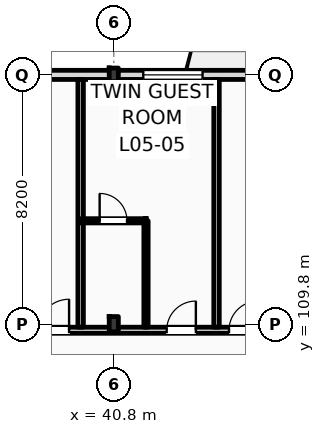
"""IFC4 building model, lengths in metres.
Left out: names, types, materials, properties, quantities, classifications, styles, units other than length and angle.
Written with IfcOpenShell. Run it as: python <this file> out.ifc"""

import sys

from ifc_helpers import new_model, si_unit, direction, frame, frame_2d, origin, origin_2d, place, context, subcontext, project, spatial, rectangle, i_section, extrude, element, fill, save


model = new_model("IFC4")
c1 = context("Model", 3, precision=1e-05, world=origin(), true_north=direction((0.0, 1.0)))
c2 = subcontext(c1, "Body", "Model", "MODEL_VIEW")
j1 = project(units=[si_unit("LENGTHUNIT", "METRE"), si_unit("PLANEANGLEUNIT", "RADIAN")], contexts=[c1])
p1 = place(None, origin())
s1 = spatial("IfcSite", under=j1, at=p1, CompositionType="ELEMENT")
p2 = place(p1, origin())
s2 = spatial("IfcBuilding", under=s1, at=p2, CompositionType="ELEMENT")
p3 = place(p2, frame((0.0, 0.0, 24.6)))
s3 = spatial("IfcBuildingStorey", under=s2, at=p3, CompositionType="ELEMENT", Elevation=24.6)
p4 = place(p3, frame((40.8, 109.8, 0.0), z_axis=(0.0, 0.0, 1.0), x_axis=(1.0, 0.0, 0.0)))
e1 = element("IfcColumn", 1, at=p4, inside=s3, PredefinedType="COLUMN", context=c2, shape_type="SweptSolid", body=[
    extrude(i_section(OverallWidth=0.3, OverallDepth=0.5, WebThickness=0.014, FlangeThickness=0.028, FilletRadius=0.027, at=origin_2d()), origin(), (0.0, 0.0, 1.0), 3.6),
])
p5 = place(p3, frame((40.8, 118.0, 0.0), z_axis=(0.0, 0.0, 1.0), x_axis=(1.0, 0.0, 0.0)))
e2 = element("IfcColumn", 2, at=p5, inside=s3, PredefinedType="COLUMN", context=c2, shape_type="SweptSolid", body=[
    extrude(i_section(OverallWidth=0.3, OverallDepth=0.45, WebThickness=0.014, FlangeThickness=0.026, FilletRadius=0.027, at=origin_2d()), origin(), (0.0, 0.0, 1.0), 3.6),
])
p6 = place(p3, frame((22.5, 118.0, 0.0), z_axis=(0.0, 0.0, 1.0), x_axis=(1.0, 0.0, 0.0)))
e3 = element("IfcWall", 3, at=p6, inside=s3, PredefinedType="STANDARD", context=c2, shape_type="SweptSolid", body=[
    extrude(rectangle(XDim=97.5, YDim=0.3, at=frame_2d((48.75, 0.0))), origin(), (0.0, 0.0, 1.0), 2.78),
])
p7 = place(p6, frame((0.91, 0.0, 0.9)))
e4 = element("IfcOpeningElement", 4, at=p7, cuts=e3, PredefinedType="OPENING", context=c2, shape_type="SweptSolid", body=[
    extrude(rectangle(XDim=0.9, YDim=1.7, at=frame_2d((0.45, 0.85))), frame((0.0, 0.16, 0.0), z_axis=(0.0, -1.0, 0.0), x_axis=(1.0, 0.0, 0.0)), (0.0, 0.0, 1.0), 0.32),
])
p8 = place(p6, frame((6.275, 0.0, 0.0)))
e5 = element("IfcOpeningElement", 5, at=p8, cuts=e3, PredefinedType="OPENING", context=c2, shape_type="SweptSolid", body=[
    extrude(rectangle(XDim=1.2, YDim=2.25, at=frame_2d((0.6, 1.125))), frame((0.0, 0.16, 0.0), z_axis=(0.0, -1.0, 0.0), x_axis=(1.0, 0.0, 0.0)), (0.0, 0.0, 1.0), 0.32),
])
p9 = place(p6, frame((11.42, 0.0, 0.9)))
e6 = element("IfcOpeningElement", 6, at=p9, cuts=e3, PredefinedType="OPENING", context=c2, shape_type="SweptSolid", body=[
    extrude(rectangle(XDim=1.35, YDim=1.7, at=frame_2d((0.675, 0.85))), frame((0.0, 0.16, 0.0), z_axis=(0.0, -1.0, 0.0), x_axis=(1.0, 0.0, 0.0)), (0.0, 0.0, 1.0), 0.32),
])
p10 = place(p6, frame((14.345, 0.0, 0.9)))
e7 = element("IfcOpeningElement", 7, at=p10, cuts=e3, PredefinedType="OPENING", context=c2, shape_type="SweptSolid", body=[
    extrude(rectangle(XDim=1.8, YDim=1.7, at=frame_2d((0.9, 0.85))), frame((0.0, 0.16, 0.0), z_axis=(0.0, -1.0, 0.0), x_axis=(1.0, 0.0, 0.0)), (0.0, 0.0, 1.0), 0.32),
])
p11 = place(p6, frame((19.27, 0.0, 0.9)))
e8 = element("IfcOpeningElement", 8, at=p11, cuts=e3, PredefinedType="OPENING", context=c2, shape_type="SweptSolid", body=[
    extrude(rectangle(XDim=1.95, YDim=1.7, at=frame_2d((0.975, 0.85))), frame((0.0, 0.16, 0.0), z_axis=(0.0, -1.0, 0.0), x_axis=(1.0, 0.0, 0.0)), (0.0, 0.0, 1.0), 0.32),
])
p12 = place(p6, frame((22.97, 0.0, 0.0)))
e9 = element("IfcOpeningElement", 9, at=p12, cuts=e3, PredefinedType="OPENING", context=c2, shape_type="SweptSolid", body=[
    extrude(rectangle(XDim=1.2, YDim=2.25, at=frame_2d((0.6, 1.125))), frame((0.0, 0.16, 0.0), z_axis=(0.0, -1.0, 0.0), x_axis=(1.0, 0.0, 0.0)), (0.0, 0.0, 1.0), 0.32),
])
p13 = place(p6, frame((26.92, 0.0, 0.9)))
e10 = element("IfcOpeningElement", 10, at=p13, cuts=e3, PredefinedType="OPENING", context=c2, shape_type="SweptSolid", body=[
    extrude(rectangle(XDim=2.25, YDim=1.7, at=frame_2d((1.125, 0.85))), frame((0.0, 0.16, 0.0), z_axis=(0.0, -1.0, 0.0), x_axis=(1.0, 0.0, 0.0)), (0.0, 0.0, 1.0), 0.32),
])
p14 = place(p6, frame((30.645, 0.0, 0.9)))
e11 = element("IfcOpeningElement", 11, at=p14, cuts=e3, PredefinedType="OPENING", context=c2, shape_type="SweptSolid", body=[
    extrude(rectangle(XDim=2.4, YDim=1.7, at=frame_2d((1.2, 0.85))), frame((0.0, 0.16, 0.0), z_axis=(0.0, -1.0, 0.0), x_axis=(1.0, 0.0, 0.0)), (0.0, 0.0, 1.0), 0.32),
])
p15 = place(p6, frame((36.71, 0.0, 0.0)))
e12 = element("IfcOpeningElement", 12, at=p15, cuts=e3, PredefinedType="OPENING", context=c2, shape_type="SweptSolid", body=[
    extrude(rectangle(XDim=1.2, YDim=2.25, at=frame_2d((0.6, 1.125))), frame((0.0, 0.16, 0.0), z_axis=(0.0, -1.0, 0.0), x_axis=(1.0, 0.0, 0.0)), (0.0, 0.0, 1.0), 0.32),
])
p16 = place(p6, frame((39.17, 0.0, 0.0)))
e13 = element("IfcOpeningElement", 13, at=p16, cuts=e3, PredefinedType="OPENING", context=c2, shape_type="SweptSolid", body=[
    extrude(rectangle(XDim=1.2, YDim=2.25, at=frame_2d((0.6, 1.125))), frame((0.0, 0.16, 0.0), z_axis=(0.0, -1.0, 0.0), x_axis=(1.0, 0.0, 0.0)), (0.0, 0.0, 1.0), 0.32),
])
p17 = place(p6, frame((43.22, 0.0, 0.9)))
e14 = element("IfcOpeningElement", 14, at=p17, cuts=e3, PredefinedType="OPENING", context=c2, shape_type="SweptSolid", body=[
    extrude(rectangle(XDim=2.85, YDim=1.7, at=frame_2d((1.425, 0.85))), frame((0.0, 0.16, 0.0), z_axis=(0.0, -1.0, 0.0), x_axis=(1.0, 0.0, 0.0)), (0.0, 0.0, 1.0), 0.32),
])
p18 = place(p6, frame((47.29, 0.0, 0.9)))
e15 = element("IfcOpeningElement", 15, at=p18, cuts=e3, PredefinedType="OPENING", context=c2, shape_type="SweptSolid", body=[
    extrude(rectangle(XDim=1.35, YDim=1.7, at=frame_2d((0.675, 0.85))), frame((0.0, 0.16, 0.0), z_axis=(0.0, -1.0, 0.0), x_axis=(1.0, 0.0, 0.0)), (0.0, 0.0, 1.0), 0.32),
])
p19 = place(p6, frame((52.91, 0.0, 0.0)))
e16 = element("IfcOpeningElement", 16, at=p19, cuts=e3, PredefinedType="OPENING", context=c2, shape_type="SweptSolid", body=[
    extrude(rectangle(XDim=1.2, YDim=2.25, at=frame_2d((0.6, 1.125))), frame((0.0, 0.16, 0.0), z_axis=(0.0, -1.0, 0.0), x_axis=(1.0, 0.0, 0.0)), (0.0, 0.0, 1.0), 0.32),
])
p20 = place(p6, frame((55.69, 0.0, 0.9)))
e17 = element("IfcOpeningElement", 17, at=p20, cuts=e3, PredefinedType="OPENING", context=c2, shape_type="SweptSolid", body=[
    extrude(rectangle(XDim=0.9, YDim=1.7, at=frame_2d((0.45, 0.85))), frame((0.0, 0.16, 0.0), z_axis=(0.0, -1.0, 0.0), x_axis=(1.0, 0.0, 0.0)), (0.0, 0.0, 1.0), 0.32),
])
p21 = place(p6, frame((59.82, 0.0, 0.9)))
e18 = element("IfcOpeningElement", 18, at=p21, cuts=e3, PredefinedType="OPENING", context=c2, shape_type="SweptSolid", body=[
    extrude(rectangle(XDim=3.25, YDim=1.7, at=frame_2d((1.625, 0.85))), frame((0.0, 0.16, 0.0), z_axis=(0.0, -1.0, 0.0), x_axis=(1.0, 0.0, 0.0)), (0.0, 0.0, 1.0), 0.32),
])
p22 = place(p6, frame((65.89, 0.0, 0.9)))
e19 = element("IfcOpeningElement", 19, at=p22, cuts=e3, PredefinedType="OPENING", context=c2, shape_type="SweptSolid", body=[
    extrude(rectangle(XDim=1.1, YDim=1.7, at=frame_2d((0.55, 0.85))), frame((0.0, 0.16, 0.0), z_axis=(0.0, -1.0, 0.0), x_axis=(1.0, 0.0, 0.0)), (0.0, 0.0, 1.0), 0.32),
])
p23 = place(p6, frame((69.245, 0.0, 0.0)))
e20 = element("IfcOpeningElement", 20, at=p23, cuts=e3, PredefinedType="OPENING", context=c2, shape_type="SweptSolid", body=[
    extrude(rectangle(XDim=1.2, YDim=2.25, at=frame_2d((0.6, 1.125))), frame((0.0, 0.16, 0.0), z_axis=(0.0, -1.0, 0.0), x_axis=(1.0, 0.0, 0.0)), (0.0, 0.0, 1.0), 0.32),
])
p24 = place(p6, frame((73.69, 0.0, 0.9)))
e21 = element("IfcOpeningElement", 21, at=p24, cuts=e3, PredefinedType="OPENING", context=c2, shape_type="SweptSolid", body=[
    extrude(rectangle(XDim=1.8, YDim=1.7, at=frame_2d((0.9, 0.85))), frame((0.0, 0.16, 0.0), z_axis=(0.0, -1.0, 0.0), x_axis=(1.0, 0.0, 0.0)), (0.0, 0.0, 1.0), 0.32),
])
p25 = place(p6, frame((76.62, 0.0, 0.9)))
e22 = element("IfcOpeningElement", 22, at=p25, cuts=e3, PredefinedType="OPENING", context=c2, shape_type="SweptSolid", body=[
    extrude(rectangle(XDim=3.25, YDim=1.7, at=frame_2d((1.625, 0.85))), frame((0.0, 0.16, 0.0), z_axis=(0.0, -1.0, 0.0), x_axis=(1.0, 0.0, 0.0)), (0.0, 0.0, 1.0), 0.32),
])
p26 = place(p6, frame((81.895, 0.0, 0.9)))
e23 = element("IfcOpeningElement", 23, at=p26, cuts=e3, PredefinedType="OPENING", context=c2, shape_type="SweptSolid", body=[
    extrude(rectangle(XDim=1.1, YDim=1.5, at=frame_2d((0.55, 0.75))), frame((0.0, 0.16, 0.0), z_axis=(0.0, -1.0, 0.0), x_axis=(1.0, 0.0, 0.0)), (0.0, 0.0, 1.0), 0.32),
])
p27 = place(p6, frame((86.02, 0.0, 0.9)))
e24 = element("IfcOpeningElement", 24, at=p27, cuts=e3, PredefinedType="OPENING", context=c2, shape_type="SweptSolid", body=[
    extrude(rectangle(XDim=1.25, YDim=1.6, at=frame_2d((0.625, 0.8))), frame((0.0, 0.16, 0.0), z_axis=(0.0, -1.0, 0.0), x_axis=(1.0, 0.0, 0.0)), (0.0, 0.0, 1.0), 0.32),
])
p28 = place(p6, frame((90.145, 0.0, 0.9)))
e25 = element("IfcOpeningElement", 25, at=p28, cuts=e3, PredefinedType="OPENING", context=c2, shape_type="SweptSolid", body=[
    extrude(rectangle(XDim=1.4, YDim=1.7, at=frame_2d((0.7, 0.85))), frame((0.0, 0.16, 0.0), z_axis=(0.0, -1.0, 0.0), x_axis=(1.0, 0.0, 0.0)), (0.0, 0.0, 1.0), 0.32),
])
p29 = place(p6, frame((94.155, 0.0, 0.9)))
e26 = element("IfcOpeningElement", 26, at=p29, cuts=e3, PredefinedType="OPENING", context=c2, shape_type="SweptSolid", body=[
    extrude(rectangle(XDim=1.6, YDim=1.7, at=frame_2d((0.8, 0.85))), frame((0.0, 0.16, 0.0), z_axis=(0.0, -1.0, 0.0), x_axis=(1.0, 0.0, 0.0)), (0.0, 0.0, 1.0), 0.32),
])
p30 = place(p3, frame((10.65, 109.6, 0.0), z_axis=(0.0, 0.0, 1.0), x_axis=(1.0, 0.0, 0.0)))
e27 = element("IfcWall", 27, at=p30, inside=s3, PredefinedType="PARTITIONING", context=c2, shape_type="SweptSolid", body=[
    extrude(rectangle(XDim=109.21, YDim=0.2, at=frame_2d((54.605, 0.0))), origin(), (0.0, 0.0, 1.0), 2.78),
])
p31 = place(p30, frame((12.705, 0.0, 0.0)))
e28 = element("IfcOpeningElement", 28, at=p31, cuts=e27, PredefinedType="OPENING", context=c2, shape_type="SweptSolid", body=[
    extrude(rectangle(XDim=1.02, YDim=2.2, at=frame_2d((0.51, 1.1))), frame((0.0, 0.11, 0.0), z_axis=(0.0, -1.0, 0.0), x_axis=(1.0, 0.0, 0.0)), (0.0, 0.0, 1.0), 0.22),
])
p32 = place(p30, frame((19.26, 0.0, 0.0)))
e29 = element("IfcOpeningElement", 29, at=p32, cuts=e27, PredefinedType="OPENING", context=c2, shape_type="SweptSolid", body=[
    extrude(rectangle(XDim=1.02, YDim=2.2, at=frame_2d((0.51, 1.1))), frame((0.0, 0.11, 0.0), z_axis=(0.0, -1.0, 0.0), x_axis=(1.0, 0.0, 0.0)), (0.0, 0.0, 1.0), 0.22),
])
p33 = place(p30, frame((23.71, 0.0, 0.0)))
e30 = element("IfcOpeningElement", 30, at=p33, cuts=e27, PredefinedType="OPENING", context=c2, shape_type="SweptSolid", body=[
    extrude(rectangle(XDim=1.02, YDim=2.2, at=frame_2d((0.51, 1.1))), frame((0.0, 0.11, 0.0), z_axis=(0.0, -1.0, 0.0), x_axis=(1.0, 0.0, 0.0)), (0.0, 0.0, 1.0), 0.22),
])
p34 = place(p30, frame((27.66, 0.0, 0.0)))
e31 = element("IfcOpeningElement", 31, at=p34, cuts=e27, PredefinedType="OPENING", context=c2, shape_type="SweptSolid", body=[
    extrude(rectangle(XDim=1.02, YDim=2.2, at=frame_2d((0.51, 1.1))), frame((0.0, 0.11, 0.0), z_axis=(0.0, -1.0, 0.0), x_axis=(1.0, 0.0, 0.0)), (0.0, 0.0, 1.0), 0.22),
])
p35 = place(p30, frame((31.89, 0.0, 0.0)))
e32 = element("IfcOpeningElement", 32, at=p35, cuts=e27, PredefinedType="OPENING", context=c2, shape_type="SweptSolid", body=[
    extrude(rectangle(XDim=0.96, YDim=2.2, at=frame_2d((0.48, 1.1))), frame((0.0, 0.11, 0.0), z_axis=(0.0, -1.0, 0.0), x_axis=(1.0, 0.0, 0.0)), (0.0, 0.0, 1.0), 0.22),
])
p36 = place(p30, frame((33.94, 0.0, 0.0)))
e33 = element("IfcOpeningElement", 33, at=p36, cuts=e27, PredefinedType="OPENING", context=c2, shape_type="SweptSolid", body=[
    extrude(rectangle(XDim=0.96, YDim=2.2, at=frame_2d((0.48, 1.1))), frame((0.0, 0.11, 0.0), z_axis=(0.0, -1.0, 0.0), x_axis=(1.0, 0.0, 0.0)), (0.0, 0.0, 1.0), 0.22),
])
p37 = place(p30, frame((40.29, 0.0, 0.0)))
e34 = element("IfcOpeningElement", 34, at=p37, cuts=e27, PredefinedType="OPENING", context=c2, shape_type="SweptSolid", body=[
    extrude(rectangle(XDim=0.96, YDim=2.2, at=frame_2d((0.48, 1.1))), frame((0.0, 0.11, 0.0), z_axis=(0.0, -1.0, 0.0), x_axis=(1.0, 0.0, 0.0)), (0.0, 0.0, 1.0), 0.22),
])
p38 = place(p30, frame((42.34, 0.0, 0.0)))
e35 = element("IfcOpeningElement", 35, at=p38, cuts=e27, PredefinedType="OPENING", context=c2, shape_type="SweptSolid", body=[
    extrude(rectangle(XDim=0.96, YDim=2.2, at=frame_2d((0.48, 1.1))), frame((0.0, 0.11, 0.0), z_axis=(0.0, -1.0, 0.0), x_axis=(1.0, 0.0, 0.0)), (0.0, 0.0, 1.0), 0.22),
])
p39 = place(p30, frame((48.69, 0.0, 0.0)))
e36 = element("IfcOpeningElement", 36, at=p39, cuts=e27, PredefinedType="OPENING", context=c2, shape_type="SweptSolid", body=[
    extrude(rectangle(XDim=0.96, YDim=2.2, at=frame_2d((0.48, 1.1))), frame((0.0, 0.11, 0.0), z_axis=(0.0, -1.0, 0.0), x_axis=(1.0, 0.0, 0.0)), (0.0, 0.0, 1.0), 0.22),
])
p40 = place(p30, frame((50.74, 0.0, 0.0)))
e37 = element("IfcOpeningElement", 37, at=p40, cuts=e27, PredefinedType="OPENING", context=c2, shape_type="SweptSolid", body=[
    extrude(rectangle(XDim=0.96, YDim=2.2, at=frame_2d((0.48, 1.1))), frame((0.0, 0.11, 0.0), z_axis=(0.0, -1.0, 0.0), x_axis=(1.0, 0.0, 0.0)), (0.0, 0.0, 1.0), 0.22),
])
p41 = place(p30, frame((57.09, 0.0, 0.0)))
e38 = element("IfcOpeningElement", 38, at=p41, cuts=e27, PredefinedType="OPENING", context=c2, shape_type="SweptSolid", body=[
    extrude(rectangle(XDim=0.96, YDim=2.2, at=frame_2d((0.48, 1.1))), frame((0.0, 0.11, 0.0), z_axis=(0.0, -1.0, 0.0), x_axis=(1.0, 0.0, 0.0)), (0.0, 0.0, 1.0), 0.22),
])
p42 = place(p30, frame((59.14, 0.0, 0.0)))
e39 = element("IfcOpeningElement", 39, at=p42, cuts=e27, PredefinedType="OPENING", context=c2, shape_type="SweptSolid", body=[
    extrude(rectangle(XDim=0.96, YDim=2.2, at=frame_2d((0.48, 1.1))), frame((0.0, 0.11, 0.0), z_axis=(0.0, -1.0, 0.0), x_axis=(1.0, 0.0, 0.0)), (0.0, 0.0, 1.0), 0.22),
])
p43 = place(p30, frame((65.49, 0.0, 0.0)))
e40 = element("IfcOpeningElement", 40, at=p43, cuts=e27, PredefinedType="OPENING", context=c2, shape_type="SweptSolid", body=[
    extrude(rectangle(XDim=0.96, YDim=2.2, at=frame_2d((0.48, 1.1))), frame((0.0, 0.11, 0.0), z_axis=(0.0, -1.0, 0.0), x_axis=(1.0, 0.0, 0.0)), (0.0, 0.0, 1.0), 0.22),
])
p44 = place(p30, frame((67.54, 0.0, 0.0)))
e41 = element("IfcOpeningElement", 41, at=p44, cuts=e27, PredefinedType="OPENING", context=c2, shape_type="SweptSolid", body=[
    extrude(rectangle(XDim=0.96, YDim=2.2, at=frame_2d((0.48, 1.1))), frame((0.0, 0.11, 0.0), z_axis=(0.0, -1.0, 0.0), x_axis=(1.0, 0.0, 0.0)), (0.0, 0.0, 1.0), 0.22),
])
p45 = place(p30, frame((73.89, 0.0, 0.0)))
e42 = element("IfcOpeningElement", 42, at=p45, cuts=e27, PredefinedType="OPENING", context=c2, shape_type="SweptSolid", body=[
    extrude(rectangle(XDim=0.96, YDim=2.2, at=frame_2d((0.48, 1.1))), frame((0.0, 0.11, 0.0), z_axis=(0.0, -1.0, 0.0), x_axis=(1.0, 0.0, 0.0)), (0.0, 0.0, 1.0), 0.22),
])
p46 = place(p30, frame((78.09, 0.0, 0.0)))
e43 = element("IfcOpeningElement", 43, at=p46, cuts=e27, PredefinedType="OPENING", context=c2, shape_type="SweptSolid", body=[
    extrude(rectangle(XDim=0.96, YDim=2.2, at=frame_2d((0.48, 1.1))), frame((0.0, 0.11, 0.0), z_axis=(0.0, -1.0, 0.0), x_axis=(1.0, 0.0, 0.0)), (0.0, 0.0, 1.0), 0.22),
])
p47 = place(p30, frame((82.29, 0.0, 0.0)))
e44 = element("IfcOpeningElement", 44, at=p47, cuts=e27, PredefinedType="OPENING", context=c2, shape_type="SweptSolid", body=[
    extrude(rectangle(XDim=0.96, YDim=2.2, at=frame_2d((0.48, 1.1))), frame((0.0, 0.11, 0.0), z_axis=(0.0, -1.0, 0.0), x_axis=(1.0, 0.0, 0.0)), (0.0, 0.0, 1.0), 0.22),
])
p48 = place(p30, frame((86.49, 0.0, 0.0)))
e45 = element("IfcOpeningElement", 45, at=p48, cuts=e27, PredefinedType="OPENING", context=c2, shape_type="SweptSolid", body=[
    extrude(rectangle(XDim=0.96, YDim=2.2, at=frame_2d((0.48, 1.1))), frame((0.0, 0.11, 0.0), z_axis=(0.0, -1.0, 0.0), x_axis=(1.0, 0.0, 0.0)), (0.0, 0.0, 1.0), 0.22),
])
p49 = place(p30, frame((88.54, 0.0, 0.0)))
e46 = element("IfcOpeningElement", 46, at=p49, cuts=e27, PredefinedType="OPENING", context=c2, shape_type="SweptSolid", body=[
    extrude(rectangle(XDim=0.96, YDim=2.2, at=frame_2d((0.48, 1.1))), frame((0.0, 0.11, 0.0), z_axis=(0.0, -1.0, 0.0), x_axis=(1.0, 0.0, 0.0)), (0.0, 0.0, 1.0), 0.22),
])
p50 = place(p30, frame((94.89, 0.0, 0.0)))
e47 = element("IfcOpeningElement", 47, at=p50, cuts=e27, PredefinedType="OPENING", context=c2, shape_type="SweptSolid", body=[
    extrude(rectangle(XDim=0.96, YDim=2.2, at=frame_2d((0.48, 1.1))), frame((0.0, 0.11, 0.0), z_axis=(0.0, -1.0, 0.0), x_axis=(1.0, 0.0, 0.0)), (0.0, 0.0, 1.0), 0.22),
])
p51 = place(p30, frame((96.94, 0.0, 0.0)))
e48 = element("IfcOpeningElement", 48, at=p51, cuts=e27, PredefinedType="OPENING", context=c2, shape_type="SweptSolid", body=[
    extrude(rectangle(XDim=0.96, YDim=2.2, at=frame_2d((0.48, 1.1))), frame((0.0, 0.11, 0.0), z_axis=(0.0, -1.0, 0.0), x_axis=(1.0, 0.0, 0.0)), (0.0, 0.0, 1.0), 0.22),
])
p52 = place(p30, frame((103.29, 0.0, 0.0)))
e49 = element("IfcOpeningElement", 49, at=p52, cuts=e27, PredefinedType="OPENING", context=c2, shape_type="SweptSolid", body=[
    extrude(rectangle(XDim=0.96, YDim=2.2, at=frame_2d((0.48, 1.1))), frame((0.0, 0.11, 0.0), z_axis=(0.0, -1.0, 0.0), x_axis=(1.0, 0.0, 0.0)), (0.0, 0.0, 1.0), 0.22),
])
p53 = place(p30, frame((105.25, 0.0, 0.0)))
e50 = element("IfcOpeningElement", 50, at=p53, cuts=e27, PredefinedType="OPENING", context=c2, shape_type="SweptSolid", body=[
    extrude(rectangle(XDim=0.96, YDim=2.2, at=frame_2d((0.48, 1.1))), frame((0.0, 0.11, 0.0), z_axis=(0.0, -1.0, 0.0), x_axis=(1.0, 0.0, 0.0)), (0.0, 0.0, 1.0), 0.22),
])
p54 = place(p30, frame((2.716, 0.0, 0.0)))
e51 = element("IfcOpeningElement", 51, at=p54, cuts=e27, PredefinedType="OPENING", context=c2, shape_type="SweptSolid", body=[
    extrude(rectangle(XDim=1.35, YDim=2.25, at=frame_2d((0.675, 1.125))), frame((0.0, 0.11, 0.0), z_axis=(0.0, -1.0, 0.0), x_axis=(1.0, 0.0, 0.0)), (0.0, 0.0, 1.0), 0.22),
])
p55 = place(p30, frame((6.65, 0.0, 0.0)))
e52 = element("IfcOpeningElement", 52, at=p55, cuts=e27, PredefinedType="OPENING", context=c2, shape_type="SweptSolid", body=[
    extrude(rectangle(XDim=1.35, YDim=2.25, at=frame_2d((0.675, 1.125))), frame((0.0, 0.11, 0.0), z_axis=(0.0, -1.0, 0.0), x_axis=(1.0, 0.0, 0.0)), (0.0, 0.0, 1.0), 0.22),
])
p56 = place(p30, frame((10.583, 0.0, 0.0)))
e53 = element("IfcOpeningElement", 53, at=p56, cuts=e27, PredefinedType="OPENING", context=c2, shape_type="SweptSolid", body=[
    extrude(rectangle(XDim=1.35, YDim=2.25, at=frame_2d((0.675, 1.125))), frame((0.0, 0.11, 0.0), z_axis=(0.0, -1.0, 0.0), x_axis=(1.0, 0.0, 0.0)), (0.0, 0.0, 1.0), 0.22),
])
for number, where, z_axis, x_axis in (
    (54, (39.71, 109.7, 0.0), (0.0, 0.0, 1.0), (0.0, 1.0, 0.0)),
    (55, (44.18, 109.7, 0.0), (0.0, 0.0, 1.0), (0.0, 1.0, 0.0)),
):
    element("IfcWall", number, at=place(p3, frame(where, z_axis=z_axis, x_axis=x_axis)), inside=s3, PredefinedType="PARTITIONING", context=c2, shape_type="SweptSolid", body=[
        extrude(rectangle(XDim=8.15, YDim=0.18, at=frame_2d((4.075, 0.0))), origin(), (0.0, 0.0, 1.0), 3.34),
    ])
p57 = place(p3, frame((41.86, 109.7, 0.0), z_axis=(0.0, 0.0, 1.0), x_axis=(0.0, 1.0, 0.0)))
e56 = element("IfcWall", 56, at=p57, inside=s3, PredefinedType="PARTITIONING", context=c2, shape_type="SweptSolid", body=[
    extrude(rectangle(XDim=3.5, YDim=0.14, at=frame_2d((1.75, 0.0))), origin(), (0.0, 0.0, 1.0), 3.34),
])
p58 = place(p3, frame((39.71, 113.2, 0.0), z_axis=(0.0, 0.0, 1.0), x_axis=(1.0, 0.0, 0.0)))
e57 = element("IfcWall", 57, at=p58, inside=s3, PredefinedType="PARTITIONING", context=c2, shape_type="SweptSolid", body=[
    extrude(rectangle(XDim=2.15, YDim=0.14, at=frame_2d((1.075, 0.0))), origin(), (0.0, 0.0, 1.0), 3.34),
])
p59 = place(p58, frame((0.625, 0.0, 0.0)))
e58 = element("IfcOpeningElement", 58, at=p59, cuts=e57, PredefinedType="OPENING", context=c2, shape_type="SweptSolid", body=[
    extrude(rectangle(XDim=0.9, YDim=2.1, at=frame_2d((0.45, 1.05))), frame((0.0, 0.08, 0.0), z_axis=(0.0, -1.0, 0.0), x_axis=(1.0, 0.0, 0.0)), (0.0, 0.0, 1.0), 0.16),
])
p60 = place(p11, origin())
e59 = element("IfcWindow", 59, at=p60, inside=s3, PartitioningType="DOUBLE_PANEL_VERTICAL", PredefinedType="WINDOW", context=c2, shape_type="SweptSolid", body=[
    extrude(rectangle(XDim=1.95, YDim=1.7, at=frame_2d((0.975, 0.85))), frame((0.0, 0.03, 0.0), z_axis=(0.0, -1.0, 0.0), x_axis=(1.0, 0.0, 0.0)), (0.0, 0.0, 1.0), 0.06),
])
fill(e8, e59)
p61 = place(p34, origin())
e60 = element("IfcDoor", 60, at=p61, inside=s3, OperationType="SINGLE_SWING_RIGHT", PredefinedType="DOOR", context=c2, shape_type="SweptSolid", body=[
    extrude(rectangle(XDim=1.02, YDim=2.2, at=frame_2d((0.51, 1.1))), frame((0.0, 0.025, 0.0), z_axis=(0.0, -1.0, 0.0), x_axis=(1.0, 0.0, 0.0)), (0.0, 0.0, 1.0), 0.05),
])
fill(e31, e60)
p62 = place(p35, origin())
e61 = element("IfcDoor", 61, at=p62, inside=s3, OperationType="SINGLE_SWING_RIGHT", PredefinedType="DOOR", context=c2, shape_type="SweptSolid", body=[
    extrude(rectangle(XDim=0.96, YDim=2.2, at=frame_2d((0.48, 1.1))), frame((0.0, 0.025, 0.0), z_axis=(0.0, -1.0, 0.0), x_axis=(1.0, 0.0, 0.0)), (0.0, 0.0, 1.0), 0.05),
])
fill(e32, e61)
p63 = place(p59, origin())
e62 = element("IfcDoor", 62, at=p63, inside=s3, OperationType="SINGLE_SWING_LEFT", PredefinedType="DOOR", context=c2, shape_type="SweptSolid", body=[
    extrude(rectangle(XDim=0.9, YDim=2.1, at=frame_2d((0.45, 1.05))), frame((0.0, 0.025, 0.0), z_axis=(0.0, -1.0, 0.0), x_axis=(1.0, 0.0, 0.0)), (0.0, 0.0, 1.0), 0.05),
])
fill(e58, e62)
p64 = place(p36, origin())
e63 = element("IfcDoor", 63, at=p64, inside=s3, OperationType="SINGLE_SWING_RIGHT", PredefinedType="DOOR", context=c2, shape_type="SweptSolid", body=[
    extrude(rectangle(XDim=0.96, YDim=2.2, at=frame_2d((0.48, 1.1))), frame((0.0, 0.025, 0.0), z_axis=(0.0, -1.0, 0.0), x_axis=(1.0, 0.0, 0.0)), (0.0, 0.0, 1.0), 0.05),
])
fill(e33, e63)
save(model, sys.argv[1])
